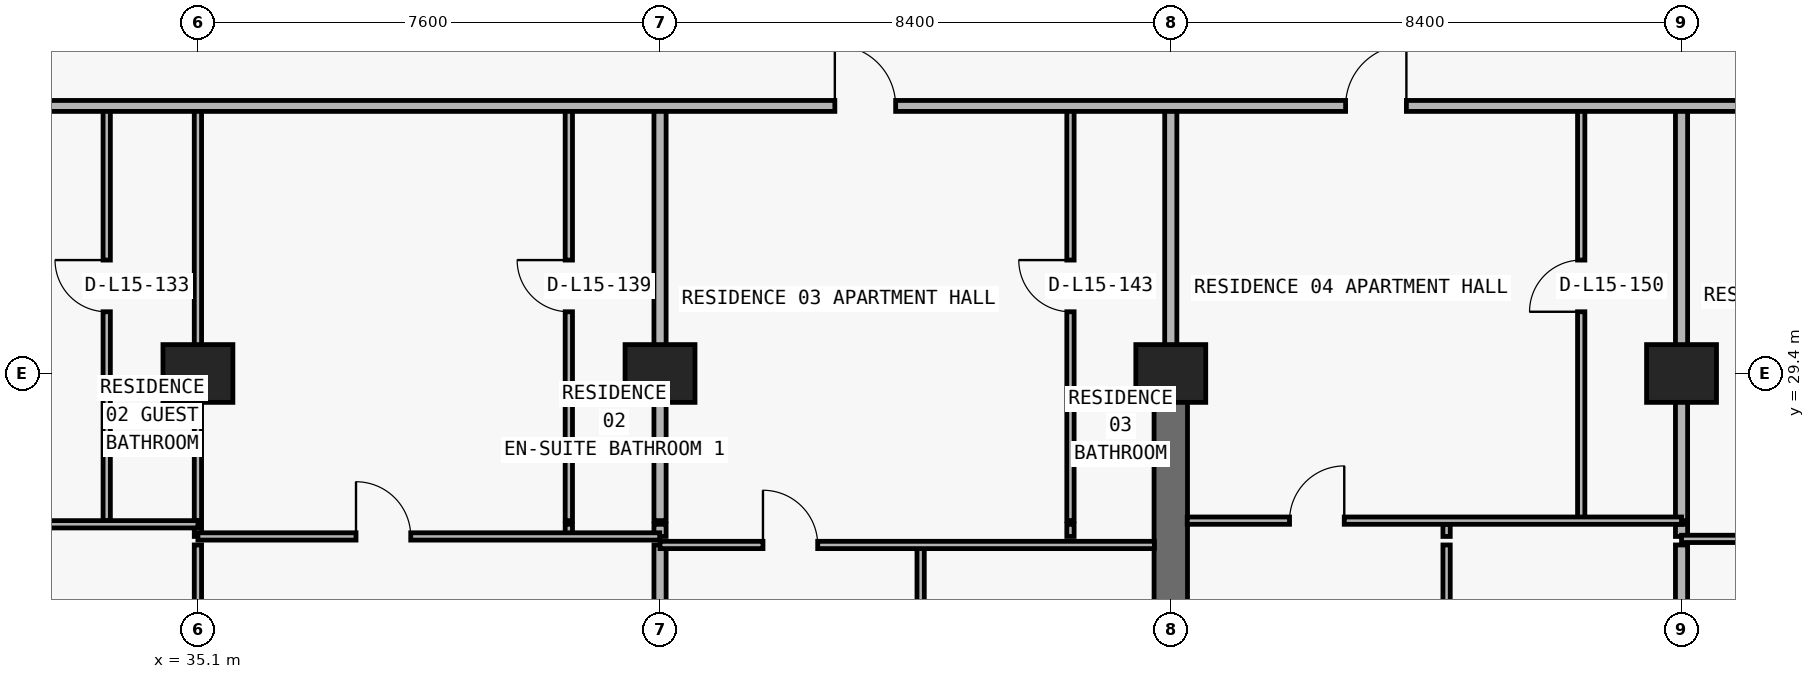
"""IFC4 building model, lengths in metres.
Left out: names, types, materials, properties, quantities, classifications, styles, units other than length and angle.
Written with IfcOpenShell. Run it as: python <this file> out.ifc"""

import sys

from ifc_helpers import new_model, si_unit, direction, frame, frame_2d, origin, origin_2d, place, context, subcontext, project, spatial, rectangle, extrude, element, fill, save


model = new_model("IFC4")
c1 = context("Model", 3, precision=1e-05, world=origin(), true_north=direction((0.0, 1.0)))
c2 = subcontext(c1, "Body", "Model", "MODEL_VIEW")
j1 = project(units=[si_unit("LENGTHUNIT", "METRE"), si_unit("PLANEANGLEUNIT", "RADIAN")], contexts=[c1])
p1 = place(None, origin())
s1 = spatial("IfcSite", under=j1, at=p1, CompositionType="ELEMENT")
p2 = place(p1, origin())
s2 = spatial("IfcBuilding", under=s1, at=p2, CompositionType="ELEMENT")
p3 = place(p2, frame((0.0, 0.0, 59.7)))
s3 = spatial("IfcBuildingStorey", under=s2, at=p3, CompositionType="ELEMENT", Elevation=59.7)
for number, where, z_axis, x_axis in (
    (1, (35.1, 29.4, 0.0), (0.0, 0.0, 1.0), (1.0, 0.0, 0.0)),
    (2, (42.7, 29.4, 0.0), (0.0, 0.0, 1.0), (1.0, 0.0, 0.0)),
    (3, (51.1, 29.4, 0.0), (0.0, 0.0, 1.0), (1.0, 0.0, 0.0)),
    (4, (59.5, 29.4, 0.0), (0.0, 0.0, 1.0), (1.0, 0.0, 0.0)),
):
    element("IfcColumn", number, at=place(p3, frame(where, z_axis=z_axis, x_axis=x_axis)), inside=s3, PredefinedType="COLUMN", context=c2, shape_type="SweptSolid", body=[
        extrude(rectangle(XDim=1.15, YDim=0.95, at=origin_2d()), origin(), (0.0, 0.0, 1.0), 3.05),
    ])
p4 = place(p3, frame((51.1, 20.8, 0.0), z_axis=(0.0, 0.0, 1.0), x_axis=(0.0, 1.0, 0.0)))
e5 = element("IfcWall", 5, at=p4, inside=s3, PredefinedType="SHEAR", context=c2, shape_type="SweptSolid", body=[
    extrude(rectangle(XDim=8.6, YDim=0.55, at=frame_2d((4.3, 0.0))), origin(), (0.0, 0.0, 1.0), 3.05),
])
p5 = place(p3, frame((33.6, 26.98, 0.0), z_axis=(0.0, 0.0, 1.0), x_axis=(0.0, 1.0, 0.0)))
e6 = element("IfcWall", 6, at=p5, inside=s3, PredefinedType="PARTITIONING", context=c2, shape_type="SweptSolid", body=[
    extrude(rectangle(XDim=6.82, YDim=0.12, at=frame_2d((3.41, 0.0))), origin(), (0.0, 0.0, 1.0), 3.05),
])
p6 = place(p5, frame((3.435, 0.0, 0.0)))
e7 = element("IfcOpeningElement", 7, at=p6, cuts=e6, PredefinedType="OPENING", context=c2, shape_type="SweptSolid", body=[
    extrude(rectangle(XDim=0.85, YDim=2.1, at=frame_2d((0.425, 1.05))), frame((0.0, 0.07, 0.0), z_axis=(0.0, -1.0, 0.0), x_axis=(1.0, 0.0, 0.0)), (0.0, 0.0, 1.0), 0.14),
])
p7 = place(p3, frame((35.1, 22.2, 0.0), z_axis=(0.0, 0.0, 1.0), x_axis=(0.0, 1.0, 0.0)))
e8 = element("IfcWall", 8, at=p7, inside=s3, PredefinedType="PARTITIONING", context=c2, shape_type="SweptSolid", body=[
    extrude(rectangle(XDim=4.38, YDim=0.12, at=frame_2d((2.19, 0.0))), origin(), (0.0, 0.0, 1.0), 2.11),
])
p8 = place(p7, frame((1.8, 0.0, 0.0)))
e9 = element("IfcOpeningElement", 9, at=p8, cuts=e8, PredefinedType="OPENING", context=c2, shape_type="SweptSolid", body=[
    extrude(rectangle(XDim=0.9, YDim=2.06, at=frame_2d((0.45, 1.03))), frame((0.0, 0.07, 0.0), z_axis=(0.0, -1.0, 0.0), x_axis=(1.0, 0.0, 0.0)), (0.0, 0.0, 1.0), 0.14),
])
p9 = place(p3, frame((35.1, 26.72, 0.0), z_axis=(0.0, 0.0, 1.0), x_axis=(0.0, 1.0, 0.0)))
e10 = element("IfcWall", 10, at=p9, inside=s3, PredefinedType="PARTITIONING", context=c2, shape_type="SweptSolid", body=[
    extrude(rectangle(XDim=0.2, YDim=0.12, at=frame_2d((0.1, 0.0))), origin(), (0.0, 0.0, 1.0), 2.11),
])
p10 = place(p3, frame((35.1, 26.98, 0.0), z_axis=(0.0, 0.0, 1.0), x_axis=(0.0, 1.0, 0.0)))
e11 = element("IfcWall", 11, at=p10, inside=s3, PredefinedType="PARTITIONING", context=c2, shape_type="SweptSolid", body=[
    extrude(rectangle(XDim=6.82, YDim=0.12, at=frame_2d((3.41, 0.0))), origin(), (0.0, 0.0, 1.0), 2.11),
])
p11 = place(p3, frame((41.2, 26.72, 0.0), z_axis=(0.0, 0.0, 1.0), x_axis=(0.0, 1.0, 0.0)))
e12 = element("IfcWall", 12, at=p11, inside=s3, PredefinedType="PARTITIONING", context=c2, shape_type="SweptSolid", body=[
    extrude(rectangle(XDim=0.2, YDim=0.12, at=frame_2d((0.1, 0.0))), origin(), (0.0, 0.0, 1.0), 3.05),
])
p12 = place(p3, frame((41.2, 26.98, 0.0), z_axis=(0.0, 0.0, 1.0), x_axis=(0.0, 1.0, 0.0)))
e13 = element("IfcWall", 13, at=p12, inside=s3, PredefinedType="PARTITIONING", context=c2, shape_type="SweptSolid", body=[
    extrude(rectangle(XDim=6.82, YDim=0.12, at=frame_2d((3.41, 0.0))), origin(), (0.0, 0.0, 1.0), 3.05),
])
p13 = place(p12, frame((3.435, 0.0, 0.0)))
e14 = element("IfcOpeningElement", 14, at=p13, cuts=e13, PredefinedType="OPENING", context=c2, shape_type="SweptSolid", body=[
    extrude(rectangle(XDim=0.85, YDim=2.1, at=frame_2d((0.425, 1.05))), frame((0.0, 0.07, 0.0), z_axis=(0.0, -1.0, 0.0), x_axis=(1.0, 0.0, 0.0)), (0.0, 0.0, 1.0), 0.14),
])
p14 = place(p3, frame((42.7, 22.2, 0.0), z_axis=(0.0, 0.0, 1.0), x_axis=(0.0, 1.0, 0.0)))
e15 = element("IfcWall", 15, at=p14, inside=s3, PredefinedType="PARTITIONING", context=c2, shape_type="SweptSolid", body=[
    extrude(rectangle(XDim=4.38, YDim=0.2, at=frame_2d((2.19, 0.0))), origin(), (0.0, 0.0, 1.0), 2.11),
])
p15 = place(p3, frame((42.7, 26.72, 0.0), z_axis=(0.0, 0.0, 1.0), x_axis=(0.0, 1.0, 0.0)))
e16 = element("IfcWall", 16, at=p15, inside=s3, PredefinedType="PARTITIONING", context=c2, shape_type="SweptSolid", body=[
    extrude(rectangle(XDim=0.2, YDim=0.2, at=frame_2d((0.1, 0.0))), origin(), (0.0, 0.0, 1.0), 2.11),
])
p16 = place(p3, frame((42.7, 26.98, 0.0), z_axis=(0.0, 0.0, 1.0), x_axis=(0.0, 1.0, 0.0)))
e17 = element("IfcWall", 17, at=p16, inside=s3, PredefinedType="PARTITIONING", context=c2, shape_type="SweptSolid", body=[
    extrude(rectangle(XDim=6.82, YDim=0.2, at=frame_2d((3.41, 0.0))), origin(), (0.0, 0.0, 1.0), 2.11),
])
p17 = place(p3, frame((46.986, 22.2, 0.0), z_axis=(0.0, 0.0, 1.0), x_axis=(0.0, 1.0, 0.0)))
e18 = element("IfcWall", 18, at=p17, inside=s3, PredefinedType="PARTITIONING", context=c2, shape_type="SweptSolid", body=[
    extrude(rectangle(XDim=4.38, YDim=0.12, at=frame_2d((2.19, 0.0))), origin(), (0.0, 0.0, 1.0), 3.05),
])
p18 = place(p17, frame((1.74, 0.0, 0.0)))
e19 = element("IfcOpeningElement", 19, at=p18, cuts=e18, PredefinedType="OPENING", context=c2, shape_type="SweptSolid", body=[
    extrude(rectangle(XDim=0.9, YDim=2.15, at=frame_2d((0.45, 1.075))), frame((0.0, 0.07, 0.0), z_axis=(0.0, -1.0, 0.0), x_axis=(1.0, 0.0, 0.0)), (0.0, 0.0, 1.0), 0.14),
])
p19 = place(p3, frame((49.45, 26.72, 0.0), z_axis=(0.0, 0.0, 1.0), x_axis=(0.0, 1.0, 0.0)))
e20 = element("IfcWall", 20, at=p19, inside=s3, PredefinedType="PARTITIONING", context=c2, shape_type="SweptSolid", body=[
    extrude(rectangle(XDim=0.2, YDim=0.12, at=frame_2d((0.1, 0.0))), origin(), (0.0, 0.0, 1.0), 3.05),
])
p20 = place(p3, frame((49.45, 26.98, 0.0), z_axis=(0.0, 0.0, 1.0), x_axis=(0.0, 1.0, 0.0)))
e21 = element("IfcWall", 21, at=p20, inside=s3, PredefinedType="PARTITIONING", context=c2, shape_type="SweptSolid", body=[
    extrude(rectangle(XDim=6.82, YDim=0.12, at=frame_2d((3.41, 0.0))), origin(), (0.0, 0.0, 1.0), 3.05),
])
p21 = place(p20, frame((3.435, 0.0, 0.0)))
e22 = element("IfcOpeningElement", 22, at=p21, cuts=e21, PredefinedType="OPENING", context=c2, shape_type="SweptSolid", body=[
    extrude(rectangle(XDim=0.85, YDim=2.1, at=frame_2d((0.425, 1.05))), frame((0.0, 0.07, 0.0), z_axis=(0.0, -1.0, 0.0), x_axis=(1.0, 0.0, 0.0)), (0.0, 0.0, 1.0), 0.14),
])
p22 = place(p3, frame((51.1, 29.405, 0.0), z_axis=(0.0, 0.0, 1.0), x_axis=(0.0, 1.0, 0.0)))
e23 = element("IfcWall", 23, at=p22, inside=s3, PredefinedType="PARTITIONING", context=c2, shape_type="SweptSolid", body=[
    extrude(rectangle(XDim=4.395, YDim=0.2, at=frame_2d((2.198, 0.0))), origin(), (0.0, 0.0, 1.0), 2.335),
])
p23 = place(p3, frame((55.636, 22.2, 0.0), z_axis=(0.0, 0.0, 1.0), x_axis=(0.0, 1.0, 0.0)))
e24 = element("IfcWall", 24, at=p23, inside=s3, PredefinedType="PARTITIONING", context=c2, shape_type="SweptSolid", body=[
    extrude(rectangle(XDim=4.38, YDim=0.12, at=frame_2d((2.19, 0.0))), origin(), (0.0, 0.0, 1.0), 3.05),
])
p24 = place(p23, frame((1.74, 0.0, 0.0)))
e25 = element("IfcOpeningElement", 25, at=p24, cuts=e24, PredefinedType="OPENING", context=c2, shape_type="SweptSolid", body=[
    extrude(rectangle(XDim=0.9, YDim=2.15, at=frame_2d((0.45, 1.075))), frame((0.0, 0.07, 0.0), z_axis=(0.0, -1.0, 0.0), x_axis=(1.0, 0.0, 0.0)), (0.0, 0.0, 1.0), 0.14),
])
p25 = place(p3, frame((55.636, 26.72, 0.0), z_axis=(0.0, 0.0, 1.0), x_axis=(0.0, 1.0, 0.0)))
e26 = element("IfcWall", 26, at=p25, inside=s3, PredefinedType="PARTITIONING", context=c2, shape_type="SweptSolid", body=[
    extrude(rectangle(XDim=0.2, YDim=0.12, at=frame_2d((0.1, 0.0))), origin(), (0.0, 0.0, 1.0), 3.05),
])
p26 = place(p3, frame((57.85, 26.98, 0.0), z_axis=(0.0, 0.0, 1.0), x_axis=(0.0, 1.0, 0.0)))
e27 = element("IfcWall", 27, at=p26, inside=s3, PredefinedType="PARTITIONING", context=c2, shape_type="SweptSolid", body=[
    extrude(rectangle(XDim=6.82, YDim=0.12, at=frame_2d((3.41, 0.0))), origin(), (0.0, 0.0, 1.0), 3.05),
])
p27 = place(p26, frame((3.435, 0.0, 0.0)))
e28 = element("IfcOpeningElement", 28, at=p27, cuts=e27, PredefinedType="OPENING", context=c2, shape_type="SweptSolid", body=[
    extrude(rectangle(XDim=0.85, YDim=2.1, at=frame_2d((0.425, 1.05))), frame((0.0, 0.07, 0.0), z_axis=(0.0, -1.0, 0.0), x_axis=(1.0, 0.0, 0.0)), (0.0, 0.0, 1.0), 0.14),
])
p28 = place(p3, frame((59.5, 22.2, 0.0), z_axis=(0.0, 0.0, 1.0), x_axis=(0.0, 1.0, 0.0)))
e29 = element("IfcWall", 29, at=p28, inside=s3, PredefinedType="PARTITIONING", context=c2, shape_type="SweptSolid", body=[
    extrude(rectangle(XDim=4.38, YDim=0.2, at=frame_2d((2.19, 0.0))), origin(), (0.0, 0.0, 1.0), 2.11),
])
p29 = place(p3, frame((59.5, 26.72, 0.0), z_axis=(0.0, 0.0, 1.0), x_axis=(0.0, 1.0, 0.0)))
e30 = element("IfcWall", 30, at=p29, inside=s3, PredefinedType="PARTITIONING", context=c2, shape_type="SweptSolid", body=[
    extrude(rectangle(XDim=0.2, YDim=0.2, at=frame_2d((0.1, 0.0))), origin(), (0.0, 0.0, 1.0), 2.11),
])
p30 = place(p3, frame((59.5, 26.98, 0.0), z_axis=(0.0, 0.0, 1.0), x_axis=(0.0, 1.0, 0.0)))
e31 = element("IfcWall", 31, at=p30, inside=s3, PredefinedType="PARTITIONING", context=c2, shape_type="SweptSolid", body=[
    extrude(rectangle(XDim=6.82, YDim=0.2, at=frame_2d((3.41, 0.0))), origin(), (0.0, 0.0, 1.0), 2.11),
])
p31 = place(p3, frame((42.7, 26.58, 0.0), z_axis=(0.0, 0.0, 1.0), x_axis=(1.0, 0.0, 0.0)))
e32 = element("IfcWall", 32, at=p31, inside=s3, PredefinedType="PARTITIONING", context=c2, shape_type="SweptSolid", body=[
    extrude(rectangle(XDim=8.13, YDim=0.12, at=frame_2d((4.065, 0.0))), origin(), (0.0, 0.0, 1.0), 3.05),
])
p32 = place(p31, frame((1.693, 0.0, 0.0)))
e33 = element("IfcOpeningElement", 33, at=p32, cuts=e32, PredefinedType="OPENING", context=c2, shape_type="SweptSolid", body=[
    extrude(rectangle(XDim=0.9, YDim=2.15, at=frame_2d((0.45, 1.075))), frame((0.0, 0.07, 0.0), z_axis=(0.0, -1.0, 0.0), x_axis=(1.0, 0.0, 0.0)), (0.0, 0.0, 1.0), 0.14),
])
p33 = place(p3, frame((59.5, 26.68, 0.0), z_axis=(0.0, 0.0, 1.0), x_axis=(1.0, 0.0, 0.0)))
e34 = element("IfcWall", 34, at=p33, inside=s3, PredefinedType="PARTITIONING", context=c2, shape_type="SweptSolid", body=[
    extrude(rectangle(XDim=8.4, YDim=0.12, at=frame_2d((4.2, 0.0))), origin(), (0.0, 0.0, 1.0), 3.05),
])
p34 = place(p33, frame((1.943, 0.0, 0.0)))
e35 = element("IfcOpeningElement", 35, at=p34, cuts=e34, PredefinedType="OPENING", context=c2, shape_type="SweptSolid", body=[
    extrude(rectangle(XDim=0.9, YDim=2.15, at=frame_2d((0.45, 1.075))), frame((0.0, 0.07, 0.0), z_axis=(0.0, -1.0, 0.0), x_axis=(1.0, 0.0, 0.0)), (0.0, 0.0, 1.0), 0.14),
])
p35 = place(p3, frame((35.1, 26.72, 0.0), z_axis=(0.0, 0.0, 1.0), x_axis=(1.0, 0.0, 0.0)))
e36 = element("IfcWall", 36, at=p35, inside=s3, PredefinedType="PARTITIONING", context=c2, shape_type="SweptSolid", body=[
    extrude(rectangle(XDim=7.595, YDim=0.12, at=frame_2d((3.797, 0.0))), origin(), (0.0, 0.0, 1.0), 3.05),
])
p36 = place(p35, frame((2.6, 0.0, 0.0)))
e37 = element("IfcOpeningElement", 37, at=p36, cuts=e36, PredefinedType="OPENING", context=c2, shape_type="SweptSolid", body=[
    extrude(rectangle(XDim=0.9, YDim=2.15, at=frame_2d((0.45, 1.075))), frame((0.0, 0.07, 0.0), z_axis=(0.0, -1.0, 0.0), x_axis=(1.0, 0.0, 0.0)), (0.0, 0.0, 1.0), 0.14),
])
p37 = place(p3, frame((26.97, 26.92, 0.0), z_axis=(0.0, 0.0, 1.0), x_axis=(1.0, 0.0, 0.0)))
e38 = element("IfcWall", 38, at=p37, inside=s3, PredefinedType="PARTITIONING", context=c2, shape_type="SweptSolid", body=[
    extrude(rectangle(XDim=8.13, YDim=0.12, at=frame_2d((4.065, 0.0))), origin(), (0.0, 0.0, 1.0), 3.05),
])
p38 = place(p37, frame((1.179, 0.0, 0.0)))
e39 = element("IfcOpeningElement", 39, at=p38, cuts=e38, PredefinedType="OPENING", context=c2, shape_type="SweptSolid", body=[
    extrude(rectangle(XDim=0.9, YDim=2.15, at=frame_2d((0.45, 1.075))), frame((0.0, 0.07, 0.0), z_axis=(0.0, -1.0, 0.0), x_axis=(1.0, 0.0, 0.0)), (0.0, 0.0, 1.0), 0.14),
])
p39 = place(p3, frame((51.37, 26.98, 0.0), z_axis=(0.0, 0.0, 1.0), x_axis=(1.0, 0.0, 0.0)))
e40 = element("IfcWall", 40, at=p39, inside=s3, PredefinedType="PARTITIONING", context=c2, shape_type="SweptSolid", body=[
    extrude(rectangle(XDim=8.13, YDim=0.12, at=frame_2d((4.065, 0.0))), origin(), (0.0, 0.0, 1.0), 3.05),
])
p40 = place(p39, frame((1.683, 0.0, 0.0)))
e41 = element("IfcOpeningElement", 41, at=p40, cuts=e40, PredefinedType="OPENING", context=c2, shape_type="SweptSolid", body=[
    extrude(rectangle(XDim=0.9, YDim=2.15, at=frame_2d((0.45, 1.075))), frame((0.0, 0.07, 0.0), z_axis=(0.0, -1.0, 0.0), x_axis=(1.0, 0.0, 0.0)), (0.0, 0.0, 1.0), 0.14),
])
p41 = place(p3, frame((5.105, 33.8, 0.0), z_axis=(0.0, 0.0, 1.0), x_axis=(1.0, 0.0, 0.0)))
e42 = element("IfcWall", 42, at=p41, inside=s3, PredefinedType="PARTITIONING", context=c2, shape_type="SweptSolid", body=[
    extrude(rectangle(XDim=67.595, YDim=0.18, at=frame_2d((33.797, 0.0))), origin(), (0.0, 0.0, 1.0), 3.05),
])
p42 = place(p41, frame((7.745, 0.0, 0.0)))
e43 = element("IfcOpeningElement", 43, at=p42, cuts=e42, PredefinedType="OPENING", context=c2, shape_type="SweptSolid", body=[
    extrude(rectangle(XDim=1.0, YDim=2.2, at=frame_2d((0.5, 1.1))), frame((0.0, 0.1, 0.0), z_axis=(0.0, -1.0, 0.0), x_axis=(1.0, 0.0, 0.0)), (0.0, 0.0, 1.0), 0.2),
])
p43 = place(p41, frame((24.545, 0.0, 0.0)))
e44 = element("IfcOpeningElement", 44, at=p43, cuts=e42, PredefinedType="OPENING", context=c2, shape_type="SweptSolid", body=[
    extrude(rectangle(XDim=1.0, YDim=2.2, at=frame_2d((0.5, 1.1))), frame((0.0, 0.1, 0.0), z_axis=(0.0, -1.0, 0.0), x_axis=(1.0, 0.0, 0.0)), (0.0, 0.0, 1.0), 0.2),
])
p44 = place(p41, frame((40.47, 0.0, 0.0)))
e45 = element("IfcOpeningElement", 45, at=p44, cuts=e42, PredefinedType="OPENING", context=c2, shape_type="SweptSolid", body=[
    extrude(rectangle(XDim=1.0, YDim=2.2, at=frame_2d((0.5, 1.1))), frame((0.0, 0.1, 0.0), z_axis=(0.0, -1.0, 0.0), x_axis=(1.0, 0.0, 0.0)), (0.0, 0.0, 1.0), 0.2),
])
p45 = place(p41, frame((48.87, 0.0, 0.0)))
e46 = element("IfcOpeningElement", 46, at=p45, cuts=e42, PredefinedType="OPENING", context=c2, shape_type="SweptSolid", body=[
    extrude(rectangle(XDim=1.0, YDim=2.2, at=frame_2d((0.5, 1.1))), frame((0.0, 0.1, 0.0), z_axis=(0.0, -1.0, 0.0), x_axis=(1.0, 0.0, 0.0)), (0.0, 0.0, 1.0), 0.2),
])
p46 = place(p41, frame((57.27, 0.0, 0.0)))
e47 = element("IfcOpeningElement", 47, at=p46, cuts=e42, PredefinedType="OPENING", context=c2, shape_type="SweptSolid", body=[
    extrude(rectangle(XDim=1.0, YDim=2.2, at=frame_2d((0.5, 1.1))), frame((0.0, 0.1, 0.0), z_axis=(0.0, -1.0, 0.0), x_axis=(1.0, 0.0, 0.0)), (0.0, 0.0, 1.0), 0.2),
])
p47 = place(p6, origin())
e48 = element("IfcDoor", 48, at=p47, inside=s3, OperationType="SINGLE_SWING_RIGHT", PredefinedType="DOOR", context=c2, shape_type="SweptSolid", body=[
    extrude(rectangle(XDim=0.85, YDim=2.1, at=frame_2d((0.425, 1.05))), frame((0.0, 0.025, 0.0), z_axis=(0.0, -1.0, 0.0), x_axis=(1.0, 0.0, 0.0)), (0.0, 0.0, 1.0), 0.05),
])
fill(e7, e48)
p48 = place(p36, origin())
e49 = element("IfcDoor", 49, at=p48, inside=s3, OperationType="SINGLE_SWING_LEFT", PredefinedType="DOOR", context=c2, shape_type="SweptSolid", body=[
    extrude(rectangle(XDim=0.9, YDim=2.15, at=frame_2d((0.45, 1.075))), frame((0.0, 0.025, 0.0), z_axis=(0.0, -1.0, 0.0), x_axis=(1.0, 0.0, 0.0)), (0.0, 0.0, 1.0), 0.05),
])
fill(e37, e49)
p49 = place(p13, origin())
e50 = element("IfcDoor", 50, at=p49, inside=s3, OperationType="SINGLE_SWING_RIGHT", PredefinedType="DOOR", context=c2, shape_type="SweptSolid", body=[
    extrude(rectangle(XDim=0.85, YDim=2.1, at=frame_2d((0.425, 1.05))), frame((0.0, 0.025, 0.0), z_axis=(0.0, -1.0, 0.0), x_axis=(1.0, 0.0, 0.0)), (0.0, 0.0, 1.0), 0.05),
])
fill(e14, e50)
p50 = place(p44, origin())
e51 = element("IfcDoor", 51, at=p50, inside=s3, OperationType="SINGLE_SWING_LEFT", PredefinedType="DOOR", context=c2, shape_type="SweptSolid", body=[
    extrude(rectangle(XDim=1.0, YDim=2.2, at=frame_2d((0.5, 1.1))), frame((0.0, 0.025, 0.0), z_axis=(0.0, -1.0, 0.0), x_axis=(1.0, 0.0, 0.0)), (0.0, 0.0, 1.0), 0.05),
])
fill(e45, e51)
p51 = place(p21, origin())
e52 = element("IfcDoor", 52, at=p51, inside=s3, OperationType="SINGLE_SWING_RIGHT", PredefinedType="DOOR", context=c2, shape_type="SweptSolid", body=[
    extrude(rectangle(XDim=0.85, YDim=2.1, at=frame_2d((0.425, 1.05))), frame((0.0, 0.025, 0.0), z_axis=(0.0, -1.0, 0.0), x_axis=(1.0, 0.0, 0.0)), (0.0, 0.0, 1.0), 0.05),
])
fill(e22, e52)
p52 = place(p32, origin())
e53 = element("IfcDoor", 53, at=p52, inside=s3, OperationType="SINGLE_SWING_LEFT", PredefinedType="DOOR", context=c2, shape_type="SweptSolid", body=[
    extrude(rectangle(XDim=0.9, YDim=2.15, at=frame_2d((0.45, 1.075))), frame((0.0, 0.025, 0.0), z_axis=(0.0, -1.0, 0.0), x_axis=(1.0, 0.0, 0.0)), (0.0, 0.0, 1.0), 0.05),
])
fill(e33, e53)
p53 = place(p45, origin())
e54 = element("IfcDoor", 54, at=p53, inside=s3, OperationType="SINGLE_SWING_RIGHT", PredefinedType="DOOR", context=c2, shape_type="SweptSolid", body=[
    extrude(rectangle(XDim=1.0, YDim=2.2, at=frame_2d((0.5, 1.1))), frame((0.0, 0.025, 0.0), z_axis=(0.0, -1.0, 0.0), x_axis=(1.0, 0.0, 0.0)), (0.0, 0.0, 1.0), 0.05),
])
fill(e46, e54)
p54 = place(p27, origin())
e55 = element("IfcDoor", 55, at=p54, inside=s3, OperationType="SINGLE_SWING_LEFT", PredefinedType="DOOR", context=c2, shape_type="SweptSolid", body=[
    extrude(rectangle(XDim=0.85, YDim=2.1, at=frame_2d((0.425, 1.05))), frame((0.0, 0.025, 0.0), z_axis=(0.0, -1.0, 0.0), x_axis=(1.0, 0.0, 0.0)), (0.0, 0.0, 1.0), 0.05),
])
fill(e28, e55)
p55 = place(p40, origin())
e56 = element("IfcDoor", 56, at=p55, inside=s3, OperationType="SINGLE_SWING_RIGHT", PredefinedType="DOOR", context=c2, shape_type="SweptSolid", body=[
    extrude(rectangle(XDim=0.9, YDim=2.15, at=frame_2d((0.45, 1.075))), frame((0.0, 0.025, 0.0), z_axis=(0.0, -1.0, 0.0), x_axis=(1.0, 0.0, 0.0)), (0.0, 0.0, 1.0), 0.05),
])
fill(e41, e56)
save(model, sys.argv[1])
